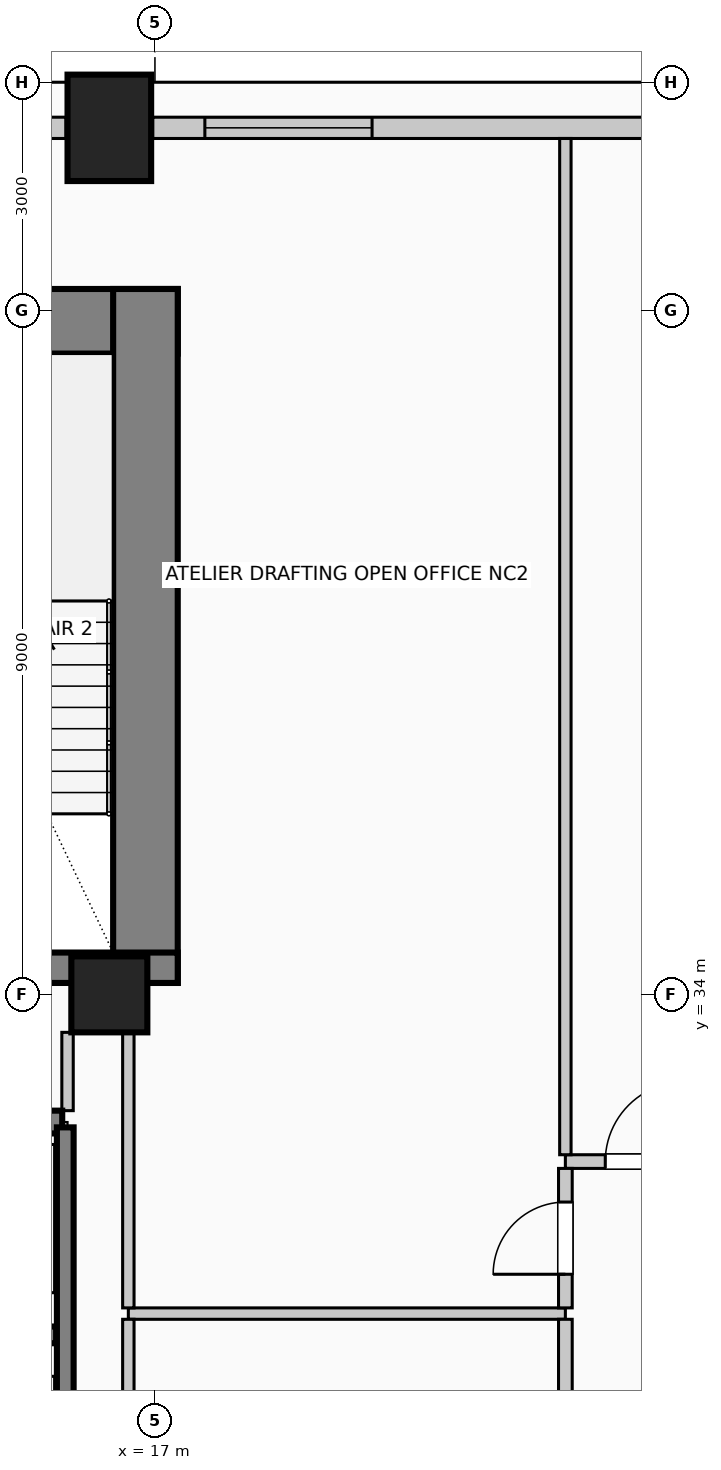
"""IFC4 building model, lengths in metres.
Left out: names, types, materials, properties, quantities, classifications, styles, units other than length and angle.
Written with IfcOpenShell. Run it as: python <this file> out.ifc"""

import sys

from ifc_helpers import new_model, si_unit, direction, frame, frame_2d, origin, origin_2d, place, context, subcontext, project, spatial, rectangle, circle, extrude, element, fill, save


model = new_model("IFC4")
c1 = context("Model", 3, precision=1e-05, world=origin(), true_north=direction((0.0, 1.0)))
c2 = subcontext(c1, "Body", "Model", "MODEL_VIEW")
j1 = project(units=[si_unit("LENGTHUNIT", "METRE"), si_unit("PLANEANGLEUNIT", "RADIAN")], contexts=[c1])
p1 = place(None, origin())
s1 = spatial("IfcSite", under=j1, at=p1, CompositionType="ELEMENT")
p2 = place(p1, origin())
s2 = spatial("IfcBuilding", under=s1, at=p2, CompositionType="ELEMENT")
p3 = place(p2, frame((0.0, 0.0, 132.6)))
s3 = spatial("IfcBuildingStorey", under=s2, at=p3, CompositionType="ELEMENT", Elevation=132.6)
p4 = place(p3, frame((2.7, 42.855, 0.0), z_axis=(0.0, 0.0, 1.0), x_axis=(1.0, 0.0, 0.0)))
e1 = element("IfcWall", 1, at=p4, inside=s3, PredefinedType="SHEAR", context=c2, shape_type="SweptSolid", body=[
    extrude(rectangle(XDim=14.6, YDim=0.85, at=frame_2d((7.3, 0.0))), origin(), (0.0, 0.0, 1.0), 4.0),
])
p5 = place(p3, frame((16.875, 34.15, 0.0), z_axis=(0.0, 0.0, 1.0), x_axis=(0.0, 1.0, 0.0)))
e2 = element("IfcWall", 2, at=p5, inside=s3, PredefinedType="SHEAR", context=c2, shape_type="SweptSolid", body=[
    extrude(rectangle(XDim=9.13, YDim=0.85, at=frame_2d((4.565, 0.0))), origin(), (0.0, 0.0, 1.0), 4.0),
])
p6 = place(p3, frame((12.29, 34.35, 0.0), z_axis=(0.0, 0.0, 1.0), x_axis=(1.0, 0.0, 0.0)))
e3 = element("IfcWall", 3, at=p6, inside=s3, PredefinedType="SHEAR", context=c2, shape_type="SweptSolid", body=[
    extrude(rectangle(XDim=5.01, YDim=0.4, at=frame_2d((2.505, 0.0))), origin(), (0.0, 0.0, 1.0), 4.0),
])
p7 = place(p6, frame((1.4, 0.0, 0.0)))
e4 = element("IfcOpeningElement", 4, at=p7, cuts=e3, PredefinedType="OPENING", context=c2, shape_type="SweptSolid", body=[
    extrude(rectangle(XDim=1.15, YDim=2.2, at=frame_2d((0.575, 1.1))), frame((0.0, 0.21, 0.0), z_axis=(0.0, -1.0, 0.0), x_axis=(1.0, 0.0, 0.0)), (0.0, 0.0, 1.0), 0.42),
])
p8 = place(p3, frame((16.4, 45.4, 0.0), z_axis=(0.0, 0.0, 1.0), x_axis=(1.0, 0.0, 0.0)))
e5 = element("IfcColumn", 5, at=p8, inside=s3, PredefinedType="COLUMN", context=c2, shape_type="SweptSolid", body=[
    extrude(rectangle(XDim=1.1, YDim=1.4, at=origin_2d()), origin(), (0.0, 0.0, 1.0), 4.0),
])
p9 = place(p3, frame((16.4, 34.0, 0.0), z_axis=(0.0, 0.0, 1.0), x_axis=(1.0, 0.0, 0.0)))
e6 = element("IfcColumn", 6, at=p9, inside=s3, PredefinedType="COLUMN", context=c2, shape_type="SweptSolid", body=[
    extrude(circle(Radius=0.5, at=origin_2d()), origin(), (0.0, 0.0, 1.0), 4.0),
])
p10 = place(p3, frame((14.445, 45.4, 0.0), z_axis=(0.0, 0.0, 1.0), x_axis=(1.0, 0.0, 0.0)))
e7 = element("IfcWall", 7, at=p10, inside=s3, PredefinedType="SOLIDWALL", context=c2, shape_type="SweptSolid", body=[
    extrude(rectangle(XDim=1.385, YDim=0.28, at=frame_2d((0.692, 0.0))), origin(), (0.0, 0.0, 1.0), 2.875),
])
p11 = place(p3, frame((16.97, 45.4, 0.0), z_axis=(0.0, 0.0, 1.0), x_axis=(1.0, 0.0, 0.0)))
e8 = element("IfcWall", 8, at=p11, inside=s3, PredefinedType="SOLIDWALL", context=c2, shape_type="SweptSolid", body=[
    extrude(rectangle(XDim=6.46, YDim=0.28, at=frame_2d((3.23, 0.0))), origin(), (0.0, 0.0, 1.0), 2.875),
])
p12 = place(p11, frame((0.687, 0.0, 0.5)))
e9 = element("IfcOpeningElement", 9, at=p12, cuts=e8, PredefinedType="OPENING", context=c2, shape_type="SweptSolid", body=[
    extrude(rectangle(XDim=2.2, YDim=1.95, at=frame_2d((1.1, 0.975))), frame((0.0, 0.15, 0.0), z_axis=(0.0, -1.0, 0.0), x_axis=(1.0, 0.0, 0.0)), (0.0, 0.0, 1.0), 0.3),
])
p13 = place(p3, frame((14.0, 32.32, 0.0), z_axis=(0.0, 0.0, 1.0), x_axis=(1.0, 0.0, 0.0)))
e10 = element("IfcWall", 10, at=p13, inside=s3, PredefinedType="SOLIDWALL", context=c2, shape_type="SweptSolid", body=[
    extrude(rectangle(XDim=1.78, YDim=0.3, at=frame_2d((0.89, 0.0))), origin(), (0.0, 0.0, 1.0), 4.0),
])
p14 = place(p13, frame((0.34, 0.0, 0.0)))
e11 = element("IfcOpeningElement", 11, at=p14, cuts=e10, PredefinedType="OPENING", context=c2, shape_type="SweptSolid", body=[
    extrude(rectangle(XDim=1.1, YDim=2.2, at=frame_2d((0.55, 1.1))), frame((0.0, 0.16, 0.0), z_axis=(0.0, -1.0, 0.0), x_axis=(1.0, 0.0, 0.0)), (0.0, 0.0, 1.0), 0.32),
])
p15 = place(p3, frame((15.82, 26.8, 0.0), z_axis=(0.0, 0.0, 1.0), x_axis=(0.0, 1.0, 0.0)))
e12 = element("IfcWall", 12, at=p15, inside=s3, PredefinedType="SOLIDWALL", context=c2, shape_type="SweptSolid", body=[
    extrude(rectangle(XDim=5.45, YDim=0.22, at=frame_2d((2.725, 0.0))), origin(), (0.0, 0.0, 1.0), 4.0),
])
p16 = place(p3, frame((12.3, 29.52, 0.0), z_axis=(0.0, 0.0, 1.0), x_axis=(1.0, 0.0, 0.0)))
e13 = element("IfcWall", 13, at=p16, inside=s3, PredefinedType="SOLIDWALL", context=c2, shape_type="SweptSolid", body=[
    extrude(rectangle(XDim=3.4, YDim=0.22, at=frame_2d((1.7, 0.0))), origin(), (0.0, 0.0, 1.0), 4.0),
])
p17 = place(p3, frame((16.65, 29.8, 0.0), z_axis=(0.0, 0.0, 1.0), x_axis=(1.0, 0.0, 0.0)))
e14 = element("IfcWall", 14, at=p17, inside=s3, PredefinedType="PARTITIONING", context=c2, shape_type="SweptSolid", body=[
    extrude(rectangle(XDim=5.75, YDim=0.15, at=frame_2d((2.875, 0.0))), origin(), (0.0, 0.0, 1.0), 3.725),
])
p18 = place(p3, frame((22.4, 31.8, 0.0), z_axis=(0.0, 0.0, 1.0), x_axis=(1.0, 0.0, 0.0)))
e15 = element("IfcWall", 15, at=p18, inside=s3, PredefinedType="PARTITIONING", context=c2, shape_type="SweptSolid", body=[
    extrude(rectangle(XDim=2.1, YDim=0.18, at=frame_2d((1.05, 0.0))), origin(), (0.0, 0.0, 1.0), 3.725),
])
p19 = place(p18, frame((0.525, 0.0, 0.0)))
e16 = element("IfcOpeningElement", 16, at=p19, cuts=e15, PredefinedType="OPENING", context=c2, shape_type="SweptSolid", body=[
    extrude(rectangle(XDim=1.05, YDim=2.15, at=frame_2d((0.525, 1.075))), frame((0.0, 0.1, 0.0), z_axis=(0.0, -1.0, 0.0), x_axis=(1.0, 0.0, 0.0)), (0.0, 0.0, 1.0), 0.2),
])
p20 = place(p3, frame((15.85, 32.47, 0.0), z_axis=(0.0, 0.0, 1.0), x_axis=(0.0, 1.0, 0.0)))
e17 = element("IfcWall", 17, at=p20, inside=s3, PredefinedType="PARTITIONING", context=c2, shape_type="SweptSolid", body=[
    extrude(rectangle(XDim=1.03, YDim=0.15, at=frame_2d((0.515, 0.0))), origin(), (0.0, 0.0, 1.0), 3.725),
])
p21 = place(p3, frame((16.65, 18.5, 0.0), z_axis=(0.0, 0.0, 1.0), x_axis=(0.0, 1.0, 0.0)))
e18 = element("IfcWall", 18, at=p21, inside=s3, PredefinedType="PARTITIONING", context=c2, shape_type="SweptSolid", body=[
    extrude(rectangle(XDim=11.225, YDim=0.15, at=frame_2d((5.613, 0.0))), origin(), (0.0, 0.0, 1.0), 3.07),
])
p22 = place(p3, frame((16.65, 29.875, 0.0), z_axis=(0.0, 0.0, 1.0), x_axis=(0.0, 1.0, 0.0)))
e19 = element("IfcWall", 19, at=p22, inside=s3, PredefinedType="PARTITIONING", context=c2, shape_type="SweptSolid", body=[
    extrude(rectangle(XDim=3.625, YDim=0.15, at=frame_2d((1.812, 0.0))), origin(), (0.0, 0.0, 1.0), 3.07),
])
p23 = place(p3, frame((22.4, 15.74, 0.0), z_axis=(0.0, 0.0, 1.0), x_axis=(0.0, 1.0, 0.0)))
e20 = element("IfcWall", 20, at=p23, inside=s3, PredefinedType="PARTITIONING", context=c2, shape_type="SweptSolid", body=[
    extrude(rectangle(XDim=13.985, YDim=0.18, at=frame_2d((6.993, 0.0))), origin(), (0.0, 0.0, 1.0), 3.725),
])
p24 = place(p3, frame((22.4, 29.875, 0.0), z_axis=(0.0, 0.0, 1.0), x_axis=(0.0, 1.0, 0.0)))
e21 = element("IfcWall", 21, at=p24, inside=s3, PredefinedType="PARTITIONING", context=c2, shape_type="SweptSolid", body=[
    extrude(rectangle(XDim=1.835, YDim=0.18, at=frame_2d((0.917, 0.0))), origin(), (0.0, 0.0, 1.0), 3.725),
])
p25 = place(p24, frame((0.442, 0.0, 0.0)))
e22 = element("IfcOpeningElement", 22, at=p25, cuts=e21, PredefinedType="OPENING", context=c2, shape_type="SweptSolid", body=[
    extrude(rectangle(XDim=0.95, YDim=2.15, at=frame_2d((0.475, 1.075))), frame((0.0, 0.1, 0.0), z_axis=(0.0, -1.0, 0.0), x_axis=(1.0, 0.0, 0.0)), (0.0, 0.0, 1.0), 0.2),
])
p26 = place(p3, frame((22.4, 31.89, 0.0), z_axis=(0.0, 0.0, 1.0), x_axis=(0.0, 1.0, 0.0)))
e23 = element("IfcWall", 23, at=p26, inside=s3, PredefinedType="PARTITIONING", context=c2, shape_type="SweptSolid", body=[
    extrude(rectangle(XDim=13.37, YDim=0.15, at=frame_2d((6.685, 0.0))), origin(), (0.0, 0.0, 1.0), 3.725),
])
p27 = place(p12, origin())
e24 = element("IfcWindow", 24, at=p27, inside=s3, PartitioningType="SINGLE_PANEL", PredefinedType="WINDOW", context=c2, shape_type="SweptSolid", body=[
    extrude(rectangle(XDim=2.2, YDim=1.95, at=frame_2d((1.1, 0.975))), frame((0.0, 0.03, 0.0), z_axis=(0.0, -1.0, 0.0), x_axis=(1.0, 0.0, 0.0)), (0.0, 0.0, 1.0), 0.06),
])
fill(e9, e24)
p28 = place(p19, origin())
e25 = element("IfcDoor", 25, at=p28, inside=s3, OperationType="SINGLE_SWING_RIGHT", PredefinedType="DOOR", context=c2, shape_type="SweptSolid", body=[
    extrude(rectangle(XDim=1.05, YDim=2.15, at=frame_2d((0.525, 1.075))), frame((0.0, 0.025, 0.0), z_axis=(0.0, -1.0, 0.0), x_axis=(1.0, 0.0, 0.0)), (0.0, 0.0, 1.0), 0.05),
])
fill(e16, e25)
p29 = place(p25, origin())
e26 = element("IfcDoor", 26, at=p29, inside=s3, OperationType="SINGLE_SWING_LEFT", PredefinedType="DOOR", context=c2, shape_type="SweptSolid", body=[
    extrude(rectangle(XDim=0.95, YDim=2.15, at=frame_2d((0.475, 1.075))), frame((0.0, 0.025, 0.0), z_axis=(0.0, -1.0, 0.0), x_axis=(1.0, 0.0, 0.0)), (0.0, 0.0, 1.0), 0.05),
])
fill(e22, e26)
save(model, sys.argv[1])
